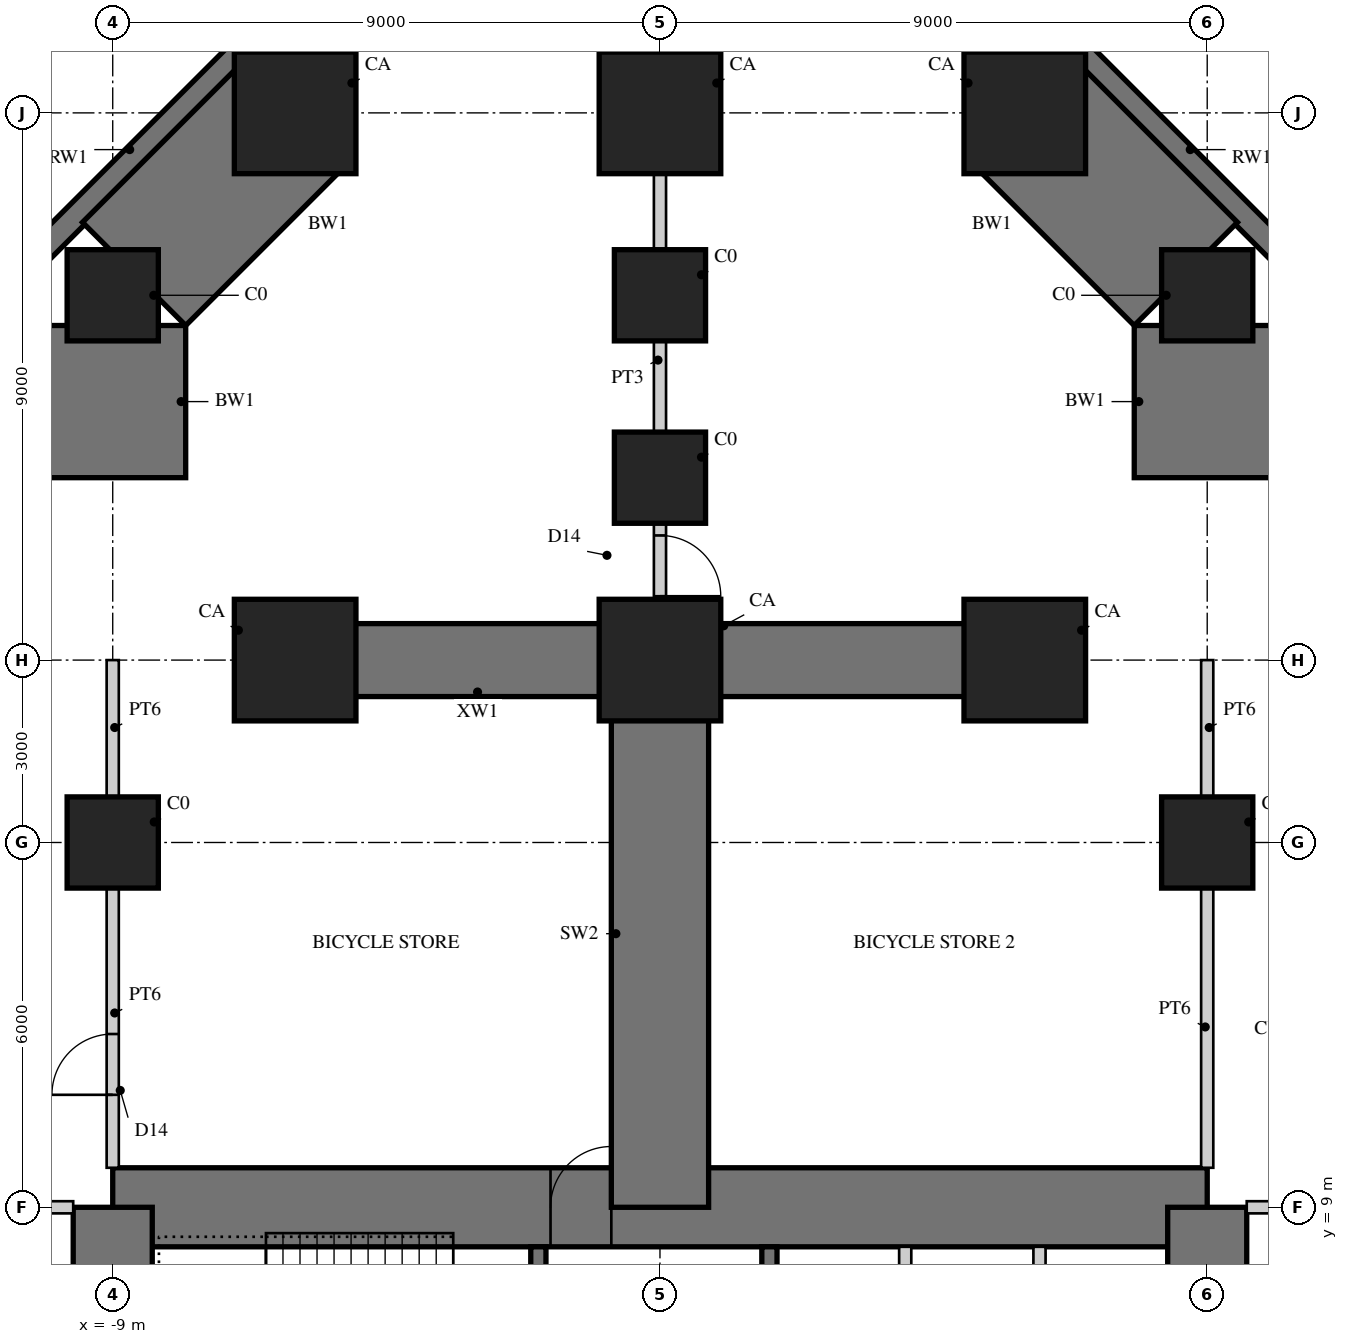
"""IFC4 building model, lengths in metres.
Left out: names, types, materials, properties, quantities, classifications, styles, units other than length and angle.
Written with IfcOpenShell. Run it as: python <this file> out.ifc"""

import sys

from ifc_helpers import new_model, si_unit, direction, frame, frame_2d, origin, origin_2d, place, context, subcontext, project, spatial, polyline, rectangle, outline, extrude, element, fill, save


model = new_model("IFC4")
c1 = context("Model", 3, precision=1e-05, world=origin(), true_north=direction((0.0, 1.0)))
c2 = subcontext(c1, "Body", "Model", "MODEL_VIEW")
j1 = project(units=[si_unit("LENGTHUNIT", "METRE"), si_unit("PLANEANGLEUNIT", "RADIAN")], contexts=[c1])
p1 = place(None, origin())
s1 = spatial("IfcSite", under=j1, at=p1, CompositionType="ELEMENT")
p2 = place(p1, origin())
s2 = spatial("IfcBuilding", under=s1, at=p2, CompositionType="ELEMENT")
p3 = place(p2, frame((0.0, 0.0, -4.0)))
s3 = spatial("IfcBuildingStorey", under=s2, at=p3, CompositionType="ELEMENT", Elevation=-4.0)
p4 = place(p3, origin())
e1 = element("IfcWall", 1, at=p4, inside=s3, PredefinedType="SOLIDWALL", context=c2, shape_type="SweptSolid", body=[
    extrude(outline(polyline([(-10.15, 24.476), (-10.55, 24.642), (-6.642, 28.55), (-6.476, 28.15), (-10.15, 24.476)])), origin(), (0.0, 0.0, 1.0), 4.0),
])
p5 = place(p3, origin())
e2 = element("IfcWall", 2, at=p5, inside=s3, PredefinedType="SOLIDWALL", context=c2, shape_type="SweptSolid", body=[
    extrude(outline(polyline([(6.476, 28.15), (6.642, 28.55), (10.55, 24.642), (10.15, 24.476), (6.476, 28.15)])), origin(), (0.0, 0.0, 1.0), 4.0),
])
p6 = place(p3, frame((9.0, 9.0, 0.0), z_axis=(0.0, 0.0, 1.0), x_axis=(-1.0, 0.0, 0.0)))
e3 = element("IfcWall", 3, at=p6, inside=s3, PredefinedType="SHEAR", context=c2, shape_type="SweptSolid", body=[
    extrude(rectangle(XDim=18.0, YDim=1.3, at=frame_2d((9.0, 0.0))), origin(), (0.0, 0.0, 1.0), 4.0),
])
p7 = place(p6, frame((9.8, 0.0, 0.0)))
e4 = element("IfcOpeningElement", 4, at=p7, cuts=e3, PredefinedType="OPENING", context=c2, shape_type="SweptSolid", body=[
    extrude(rectangle(XDim=1.0, YDim=2.4, at=frame_2d((0.5, 1.2))), frame((0.0, 0.66, 0.0), z_axis=(0.0, -1.0, 0.0), x_axis=(1.0, 0.0, 0.0)), (0.0, 0.0, 1.0), 1.32),
])
p8 = place(p3, frame((9.0, -9.0, 0.0), z_axis=(0.0, 0.0, 1.0), x_axis=(0.0, 1.0, 0.0)))
e5 = element("IfcWall", 5, at=p8, inside=s3, PredefinedType="SHEAR", context=c2, shape_type="SweptSolid", body=[
    extrude(rectangle(XDim=18.0, YDim=1.3, at=frame_2d((9.0, 0.0))), origin(), (0.0, 0.0, 1.0), 4.0),
])
p9 = place(p8, frame((9.8, 0.0, 0.0)))
e6 = element("IfcOpeningElement", 6, at=p9, cuts=e5, PredefinedType="OPENING", context=c2, shape_type="SweptSolid", body=[
    extrude(rectangle(XDim=1.0, YDim=2.4, at=frame_2d((0.5, 1.2))), frame((0.0, 0.66, 0.0), z_axis=(0.0, -1.0, 0.0), x_axis=(1.0, 0.0, 0.0)), (0.0, 0.0, 1.0), 1.32),
])
p10 = place(p3, frame((-9.0, 9.0, 0.0), z_axis=(0.0, 0.0, 1.0), x_axis=(0.0, -1.0, 0.0)))
e7 = element("IfcWall", 7, at=p10, inside=s3, PredefinedType="SHEAR", context=c2, shape_type="SweptSolid", body=[
    extrude(rectangle(XDim=18.0, YDim=1.3, at=frame_2d((9.0, 0.0))), origin(), (0.0, 0.0, 1.0), 4.0),
])
p11 = place(p10, frame((9.8, 0.0, 0.0)))
e8 = element("IfcOpeningElement", 8, at=p11, cuts=e7, PredefinedType="OPENING", context=c2, shape_type="SweptSolid", body=[
    extrude(rectangle(XDim=1.0, YDim=2.4, at=frame_2d((0.5, 1.2))), frame((0.0, 0.66, 0.0), z_axis=(0.0, -1.0, 0.0), x_axis=(1.0, 0.0, 0.0)), (0.0, 0.0, 1.0), 1.32),
])
p12 = place(p3, frame((1.8, 1.875, 0.0), z_axis=(0.0, 0.0, 1.0), x_axis=(0.0, 1.0, 0.0)))
e9 = element("IfcWall", 9, at=p12, inside=s3, PredefinedType="SHEAR", context=c2, shape_type="SweptSolid", body=[
    extrude(rectangle(XDim=6.475, YDim=0.25, at=frame_2d((3.238, 0.0))), origin(), (0.0, 0.0, 1.0), 4.0),
])
p13 = place(p12, frame((1.875, 0.0, 0.0)))
e10 = element("IfcOpeningElement", 10, at=p13, cuts=e9, PredefinedType="OPENING", context=c2, shape_type="SweptSolid", body=[
    extrude(rectangle(XDim=1.6, YDim=2.4, at=frame_2d((0.8, 1.2))), frame((0.0, 0.135, 0.0), z_axis=(0.0, -1.0, 0.0), x_axis=(1.0, 0.0, 0.0)), (0.0, 0.0, 1.0), 0.27),
])
for number, where, z_axis, x_axis in (
    (11, (4.033, 5.975, 0.0), (0.0, 0.0, 1.0), (0.0, 1.0, 0.0)),
    (12, (6.242, 5.975, 0.0), (0.0, 0.0, 1.0), (0.0, 1.0, 0.0)),
):
    element("IfcWall", number, at=place(p3, frame(where, z_axis=z_axis, x_axis=x_axis)), inside=s3, PredefinedType="PARTITIONING", context=c2, shape_type="SweptSolid", body=[
        extrude(rectangle(XDim=2.375, YDim=0.2, at=frame_2d((1.188, 0.0))), origin(), (0.0, 0.0, 1.0), 4.0),
    ])
p14 = place(p3, frame((-2.0, 1.675, 0.0), z_axis=(0.0, 0.0, 1.0), x_axis=(0.0, 1.0, 0.0)))
e13 = element("IfcWall", 13, at=p14, inside=s3, PredefinedType="SHEAR", context=c2, shape_type="SweptSolid", body=[
    extrude(rectangle(XDim=6.675, YDim=0.25, at=frame_2d((3.337, 0.0))), origin(), (0.0, 0.0, 1.0), 4.0),
])
p15 = place(p14, frame((0.725, 0.0, 0.0)))
e14 = element("IfcOpeningElement", 14, at=p15, cuts=e13, PredefinedType="OPENING", context=c2, shape_type="SweptSolid", body=[
    extrude(rectangle(XDim=1.0, YDim=2.1, at=frame_2d((0.5, 1.05))), frame((0.0, 0.135, 0.0), z_axis=(0.0, -1.0, 0.0), x_axis=(1.0, 0.0, 0.0)), (0.0, 0.0, 1.0), 0.27),
])
p16 = place(p3, frame((0.0, 9.0, 0.0), z_axis=(0.0, 0.0, 1.0), x_axis=(0.0, 1.0, 0.0)))
e15 = element("IfcWall", 15, at=p16, inside=s3, PredefinedType="SHEAR", context=c2, shape_type="SweptSolid", body=[
    extrude(rectangle(XDim=9.0, YDim=1.6, at=frame_2d((4.5, 0.0))), origin(), (0.0, 0.0, 1.0), 4.0),
])
for number, where, z_axis, x_axis in (
    (16, (0.0, 18.0, 0.0), (0.0, 0.0, 1.0), (-1.0, 0.0, 0.0)),
    (17, (0.0, 18.0, 0.0), (0.0, 0.0, 1.0), (1.0, 0.0, 0.0)),
):
    element("IfcWall", number, at=place(p3, frame(where, z_axis=z_axis, x_axis=x_axis)), inside=s3, PredefinedType="SHEAR", context=c2, shape_type="SweptSolid", body=[
        extrude(rectangle(XDim=6.0, YDim=1.2, at=frame_2d((3.0, 0.0))), origin(), (0.0, 0.0, 1.0), 4.0),
    ])
p17 = place(p3, frame((-9.0, 21.0, 0.0), z_axis=(0.0, 0.0, 1.0), x_axis=(0.0, 1.0, 0.0)))
e18 = element("IfcWall", 18, at=p17, inside=s3, PredefinedType="SHEAR", context=c2, shape_type="SweptSolid", body=[
    extrude(rectangle(XDim=2.503, YDim=2.4, at=frame_2d((1.251, 0.0))), origin(), (0.0, 0.0, 1.0), 4.0),
])
p18 = place(p3, frame((-8.648, 24.352, 0.0), z_axis=(0.0, 0.0, 1.0), x_axis=(0.707106781187, 0.707106781187, 0.0)))
e19 = element("IfcWall", 19, at=p18, inside=s3, PredefinedType="SHEAR", context=c2, shape_type="SweptSolid", body=[
    extrude(rectangle(XDim=3.745, YDim=2.4, at=frame_2d((1.873, 0.0))), origin(), (0.0, 0.0, 1.0), 4.0),
])
p19 = place(p3, frame((9.0, 21.0, 0.0), z_axis=(0.0, 0.0, 1.0), x_axis=(0.0, 1.0, 0.0)))
e20 = element("IfcWall", 20, at=p19, inside=s3, PredefinedType="SHEAR", context=c2, shape_type="SweptSolid", body=[
    extrude(rectangle(XDim=2.503, YDim=2.4, at=frame_2d((1.251, 0.0))), origin(), (0.0, 0.0, 1.0), 4.0),
])
p20 = place(p3, frame((8.648, 24.352, 0.0), z_axis=(0.0, 0.0, 1.0), x_axis=(-0.707106781187, 0.707106781187, 0.0)))
e21 = element("IfcWall", 21, at=p20, inside=s3, PredefinedType="SHEAR", context=c2, shape_type="SweptSolid", body=[
    extrude(rectangle(XDim=3.745, YDim=2.4, at=frame_2d((1.873, 0.0))), origin(), (0.0, 0.0, 1.0), 4.0),
])
for number, where, z_axis, x_axis in (
    (22, (9.0, 15.0, 0.0), (0.0, 0.0, 1.0), (1.0, 0.0, 0.0)),
    (23, (9.0, 24.0, 0.0), (0.0, 0.0, 1.0), (1.0, 0.0, 0.0)),
    (24, (-9.0, 15.0, 0.0), (0.0, 0.0, 1.0), (1.0, 0.0, 0.0)),
    (25, (-9.0, 24.0, 0.0), (0.0, 0.0, 1.0), (1.0, 0.0, 0.0)),
):
    element("IfcColumn", number, at=place(p3, frame(where, z_axis=z_axis, x_axis=x_axis)), inside=s3, PredefinedType="COLUMN", context=c2, shape_type="SweptSolid", body=[
        extrude(rectangle(XDim=1.5, YDim=1.5, at=origin_2d()), origin(), (0.0, 0.0, 1.0), 4.0),
    ])
for number, where, z_axis, x_axis in (
    (26, (6.0, 27.0, 0.0), (0.0, 0.0, 1.0), (1.0, 0.0, 0.0)),
    (27, (0.0, 27.0, 0.0), (0.0, 0.0, 1.0), (1.0, 0.0, 0.0)),
    (28, (-6.0, 27.0, 0.0), (0.0, 0.0, 1.0), (1.0, 0.0, 0.0)),
    (29, (6.0, 18.0, 0.0), (0.0, 0.0, 1.0), (1.0, 0.0, 0.0)),
    (30, (0.0, 18.0, 0.0), (0.0, 0.0, 1.0), (1.0, 0.0, 0.0)),
    (31, (-6.0, 18.0, 0.0), (0.0, 0.0, 1.0), (1.0, 0.0, 0.0)),
):
    element("IfcColumn", number, at=place(p3, frame(where, z_axis=z_axis, x_axis=x_axis)), inside=s3, PredefinedType="COLUMN", context=c2, shape_type="SweptSolid", body=[
        extrude(rectangle(XDim=2.0, YDim=2.0, at=origin_2d()), origin(), (0.0, 0.0, 1.0), 4.0),
    ])
for number, where, z_axis, x_axis in (
    (32, (0.0, 21.0, 0.0), (0.0, 0.0, 1.0), (1.0, 0.0, 0.0)),
    (33, (0.0, 24.0, 0.0), (0.0, 0.0, 1.0), (1.0, 0.0, 0.0)),
):
    element("IfcColumn", number, at=place(p3, frame(where, z_axis=z_axis, x_axis=x_axis)), inside=s3, PredefinedType="COLUMN", context=c2, shape_type="SweptSolid", body=[
        extrude(rectangle(XDim=1.5, YDim=1.5, at=origin_2d()), origin(), (0.0, 0.0, 1.0), 4.0),
    ])
p21 = place(p3, frame((-9.0, 9.65, 0.0), z_axis=(0.0, 0.0, 1.0), x_axis=(0.0, 1.0, 0.0)))
e34 = element("IfcWall", 34, at=p21, inside=s3, PredefinedType="SOLIDWALL", context=c2, shape_type="SweptSolid", body=[
    extrude(rectangle(XDim=4.6, YDim=0.2, at=frame_2d((2.3, 0.0))), origin(), (0.0, 0.0, 1.0), 2.7),
])
p22 = place(p21, frame((1.2, 0.0, 0.0)))
e35 = element("IfcOpeningElement", 35, at=p22, cuts=e34, PredefinedType="OPENING", context=c2, shape_type="SweptSolid", body=[
    extrude(rectangle(XDim=1.0, YDim=2.2, at=frame_2d((0.5, 1.1))), frame((0.0, 0.11, 0.0), z_axis=(0.0, -1.0, 0.0), x_axis=(1.0, 0.0, 0.0)), (0.0, 0.0, 1.0), 0.22),
])
p23 = place(p3, frame((-9.0, 15.75, 0.0), z_axis=(0.0, 0.0, 1.0), x_axis=(0.0, 1.0, 0.0)))
e36 = element("IfcWall", 36, at=p23, inside=s3, PredefinedType="SOLIDWALL", context=c2, shape_type="SweptSolid", body=[
    extrude(rectangle(XDim=2.25, YDim=0.2, at=frame_2d((1.125, 0.0))), origin(), (0.0, 0.0, 1.0), 2.7),
])
p24 = place(p3, frame((-14.25, 9.0, 0.0), z_axis=(0.0, 0.0, 1.0), x_axis=(1.0, 0.0, 0.0)))
e37 = element("IfcWall", 37, at=p24, inside=s3, PredefinedType="SOLIDWALL", context=c2, shape_type="SweptSolid", body=[
    extrude(rectangle(XDim=4.6, YDim=0.2, at=frame_2d((2.3, 0.0))), origin(), (0.0, 0.0, 1.0), 2.7),
])
p25 = place(p3, frame((9.65, 9.0, 0.0), z_axis=(0.0, 0.0, 1.0), x_axis=(1.0, 0.0, 0.0)))
e38 = element("IfcWall", 38, at=p25, inside=s3, PredefinedType="SOLIDWALL", context=c2, shape_type="SweptSolid", body=[
    extrude(rectangle(XDim=4.6, YDim=0.2, at=frame_2d((2.3, 0.0))), origin(), (0.0, 0.0, 1.0), 2.7),
])
p26 = place(p25, frame((1.2, 0.0, 0.0)))
e39 = element("IfcOpeningElement", 39, at=p26, cuts=e38, PredefinedType="OPENING", context=c2, shape_type="SweptSolid", body=[
    extrude(rectangle(XDim=1.0, YDim=2.2, at=frame_2d((0.5, 1.1))), frame((0.0, 0.11, 0.0), z_axis=(0.0, -1.0, 0.0), x_axis=(1.0, 0.0, 0.0)), (0.0, 0.0, 1.0), 0.22),
])
p27 = place(p3, frame((9.0, 14.25, 0.0), z_axis=(0.0, 0.0, 1.0), x_axis=(0.0, -1.0, 0.0)))
e40 = element("IfcWall", 40, at=p27, inside=s3, PredefinedType="SOLIDWALL", context=c2, shape_type="SweptSolid", body=[
    extrude(rectangle(XDim=4.6, YDim=0.2, at=frame_2d((2.3, 0.0))), origin(), (0.0, 0.0, 1.0), 2.7),
])
p28 = place(p3, frame((9.0, 18.0, 0.0), z_axis=(0.0, 0.0, 1.0), x_axis=(0.0, -1.0, 0.0)))
e41 = element("IfcWall", 41, at=p28, inside=s3, PredefinedType="SOLIDWALL", context=c2, shape_type="SweptSolid", body=[
    extrude(rectangle(XDim=2.25, YDim=0.2, at=frame_2d((1.125, 0.0))), origin(), (0.0, 0.0, 1.0), 2.7),
])
p29 = place(p3, frame((0.0, 18.0, 0.0), z_axis=(0.0, 0.0, 1.0), x_axis=(0.0, 1.0, 0.0)))
e42 = element("IfcWall", 42, at=p29, inside=s3, PredefinedType="SOLIDWALL", context=c2, shape_type="SweptSolid", body=[
    extrude(rectangle(XDim=3.0, YDim=0.2, at=frame_2d((1.5, 0.0))), origin(), (0.0, 0.0, 1.0), 3.7),
])
p30 = place(p29, frame((1.05, 0.0, 0.0)))
e43 = element("IfcOpeningElement", 43, at=p30, cuts=e42, PredefinedType="OPENING", context=c2, shape_type="SweptSolid", body=[
    extrude(rectangle(XDim=1.0, YDim=2.2, at=frame_2d((0.5, 1.1))), frame((0.0, 0.11, 0.0), z_axis=(0.0, -1.0, 0.0), x_axis=(1.0, 0.0, 0.0)), (0.0, 0.0, 1.0), 0.22),
])
p31 = place(p3, frame((0.0, 21.0, 0.0), z_axis=(0.0, 0.0, 1.0), x_axis=(0.0, 1.0, 0.0)))
e44 = element("IfcWall", 44, at=p31, inside=s3, PredefinedType="SOLIDWALL", context=c2, shape_type="SweptSolid", body=[
    extrude(rectangle(XDim=6.0, YDim=0.2, at=frame_2d((3.0, 0.0))), origin(), (0.0, 0.0, 1.0), 2.7),
])
p32 = place(p22, origin())
e45 = element("IfcDoor", 45, at=p32, inside=s3, OperationType="SINGLE_SWING_LEFT", PredefinedType="DOOR", context=c2, shape_type="SweptSolid", body=[
    extrude(rectangle(XDim=1.0, YDim=2.2, at=frame_2d((0.5, 1.1))), frame((0.0, 0.025, 0.0), z_axis=(0.0, -1.0, 0.0), x_axis=(1.0, 0.0, 0.0)), (0.0, 0.0, 1.0), 0.05),
])
fill(e35, e45)
p33 = place(p30, frame((1.0, 0.0, 0.0), z_axis=(0.0, 0.0, 1.0), x_axis=(-1.0, 0.0, 0.0)))
e46 = element("IfcDoor", 46, at=p33, inside=s3, OperationType="SINGLE_SWING_RIGHT", PredefinedType="DOOR", context=c2, shape_type="SweptSolid", body=[
    extrude(rectangle(XDim=1.0, YDim=2.2, at=frame_2d((0.5, 1.1))), frame((0.0, 0.025, 0.0), z_axis=(0.0, -1.0, 0.0), x_axis=(1.0, 0.0, 0.0)), (0.0, 0.0, 1.0), 0.05),
])
fill(e43, e46)
p34 = place(p7, frame((1.0, 0.0, 0.0), z_axis=(0.0, 0.0, 1.0), x_axis=(-1.0, 0.0, 0.0)))
e47 = element("IfcDoor", 47, at=p34, inside=s3, OperationType="SINGLE_SWING_RIGHT", PredefinedType="DOOR", context=c2, shape_type="SweptSolid", body=[
    extrude(rectangle(XDim=1.0, YDim=2.4, at=frame_2d((0.5, 1.2))), frame((0.0, -0.005, 0.0), z_axis=(0.0, -1.0, 0.0), x_axis=(1.0, 0.0, 0.0)), (0.0, 0.0, 1.0), 0.05),
])
fill(e4, e47)
save(model, sys.argv[1])
